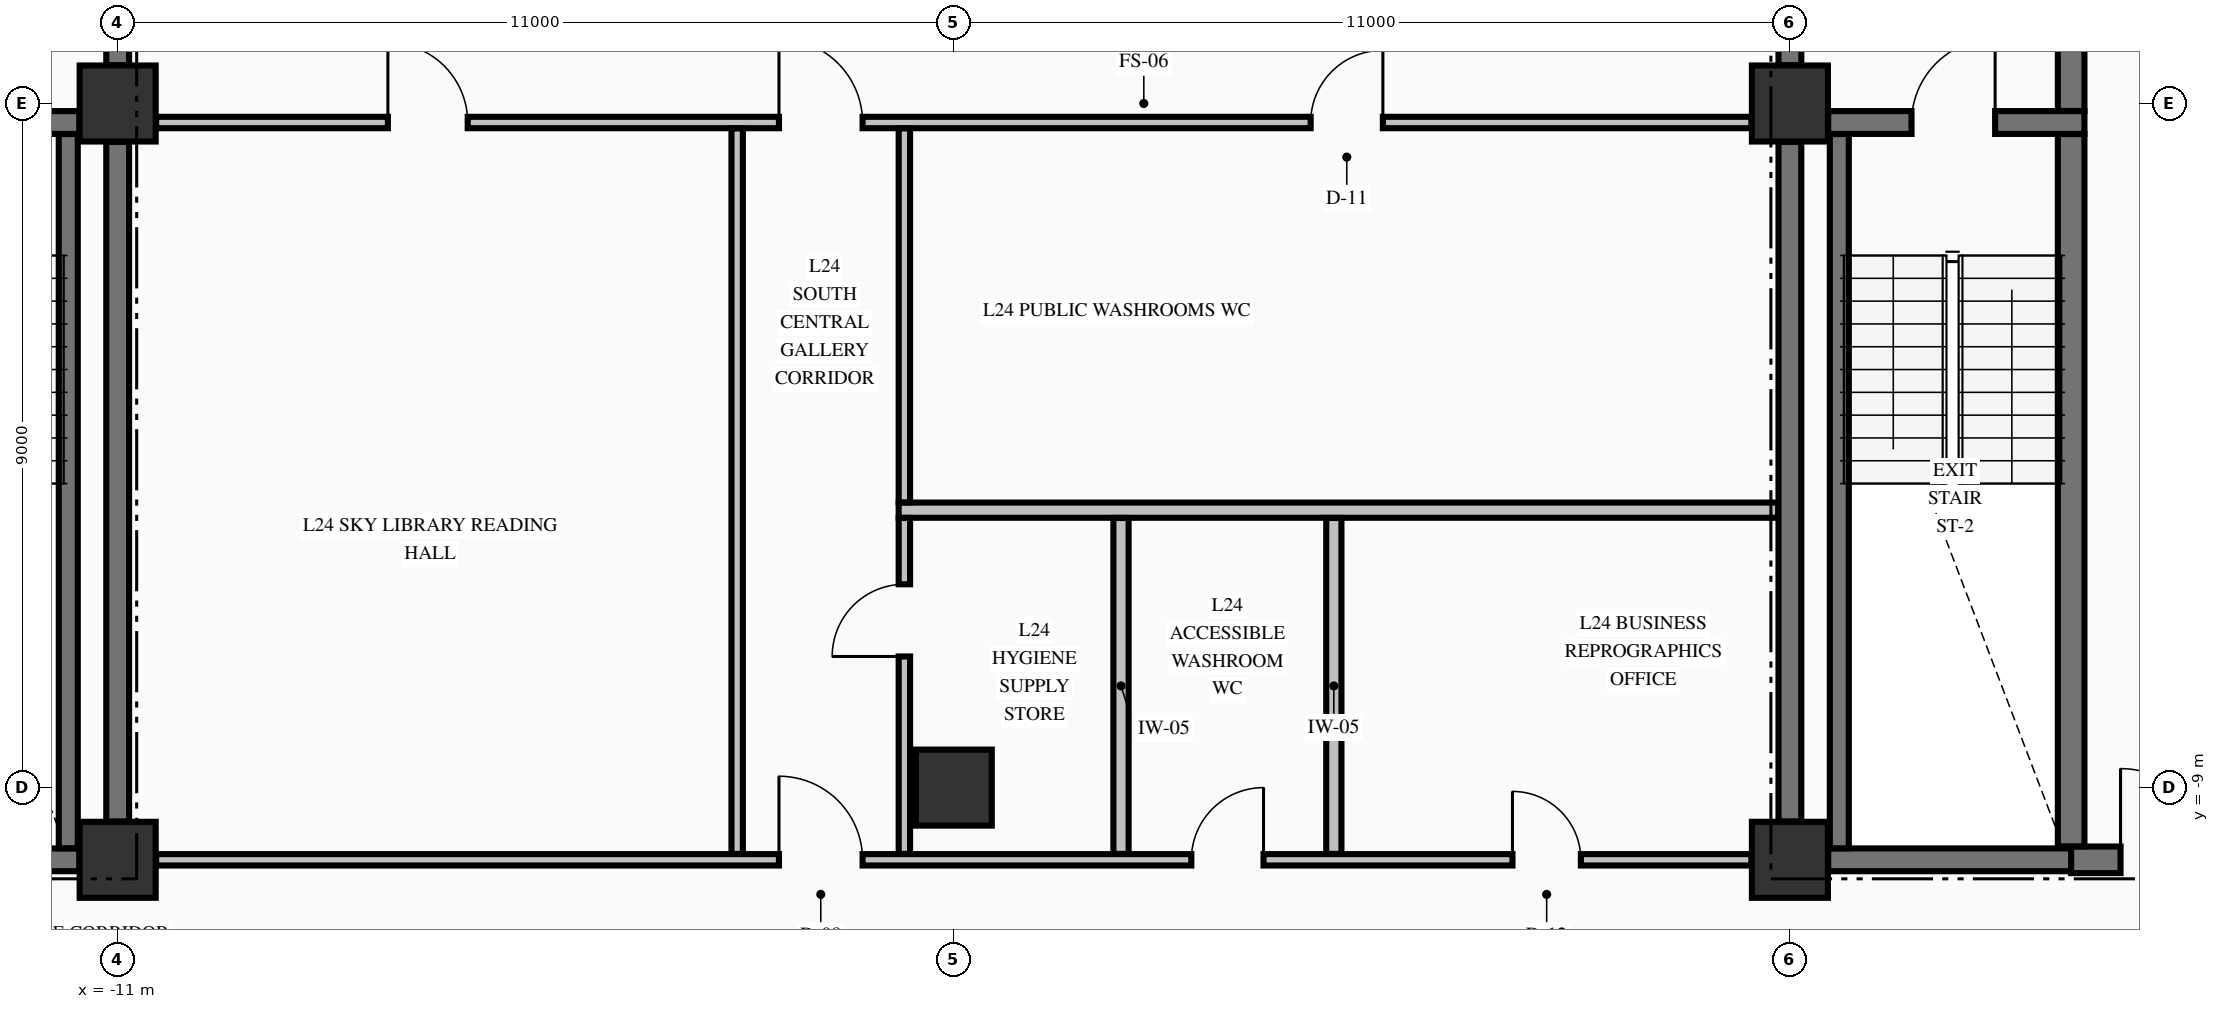
"""IFC4 building model, lengths in metres.
Left out: names, types, materials, properties, quantities, classifications, styles, units other than length and angle.
Written with IfcOpenShell. Run it as: python <this file> out.ifc"""

import sys

from ifc_helpers import new_model, si_unit, direction, frame, frame_2d, origin, origin_2d, place, context, subcontext, project, spatial, rectangle, extrude, element, fill, save


model = new_model("IFC4")
c1 = context("Model", 3, precision=1e-05, world=origin(), true_north=direction((0.0, 1.0)))
c2 = subcontext(c1, "Body", "Model", "MODEL_VIEW")
j1 = project(units=[si_unit("LENGTHUNIT", "METRE"), si_unit("PLANEANGLEUNIT", "RADIAN")], contexts=[c1])
p1 = place(None, origin())
s1 = spatial("IfcSite", under=j1, at=p1, CompositionType="ELEMENT")
p2 = place(p1, origin())
s2 = spatial("IfcBuilding", under=s1, at=p2, CompositionType="ELEMENT")
p3 = place(p2, frame((0.0, 0.0, 98.5)))
s3 = spatial("IfcBuildingStorey", under=s2, at=p3, CompositionType="ELEMENT", Elevation=98.5)
for number, where, z_axis, x_axis in (
    (1, (-11.0, -9.95, -0.275), (0.0, 0.0, 1.0), (1.0, 0.0, 0.0)),
    (2, (-11.0, 0.0, -0.275), (0.0, 0.0, 1.0), (1.0, 0.0, 0.0)),
    (3, (11.0, -9.95, -0.275), (0.0, 0.0, 1.0), (1.0, 0.0, 0.0)),
    (4, (11.0, 0.0, -0.275), (0.0, 0.0, 1.0), (1.0, 0.0, 0.0)),
    (5, (0.0, -9.0, -0.275), (0.0, 0.0, 1.0), (1.0, 0.0, 0.0)),
):
    element("IfcColumn", number, at=place(p3, frame(where, z_axis=z_axis, x_axis=x_axis)), inside=s3, PredefinedType="COLUMN", context=c2, shape_type="SweptSolid", body=[
        extrude(rectangle(XDim=1.0, YDim=1.0, at=origin_2d()), origin(), (0.0, 0.0, 1.0), 3.595),
    ])
for number, where, z_axis, x_axis in (
    (6, (-14.7, -9.95, 0.0), (0.0, 0.0, 1.0), (1.0, 0.0, 0.0)),
    (7, (11.504, -9.95, 0.0), (0.0, 0.0, 1.0), (1.0, 0.0, 0.0)),
):
    element("IfcWall", number, at=place(p3, frame(where, z_axis=z_axis, x_axis=x_axis)), inside=s3, PredefinedType="SHEAR", context=c2, shape_type="SweptSolid", body=[
        extrude(rectangle(XDim=3.196, YDim=0.3, at=frame_2d((1.598, 0.0))), origin(), (0.0, 0.0, 1.0), 3.32),
    ])
p4 = place(p3, frame((14.7, -9.95, 0.0), z_axis=(0.0, 0.0, 1.0), x_axis=(1.0, 0.0, 0.0)))
e8 = element("IfcWall", 8, at=p4, inside=s3, PredefinedType="SHEAR", context=c2, shape_type="SweptSolid", body=[
    extrude(rectangle(XDim=4.796, YDim=0.35, at=frame_2d((2.398, 0.0))), origin(), (0.0, 0.0, 1.0), 3.32),
])
p5 = place(p4, frame((0.65, 0.0, 0.0)))
e9 = element("IfcOpeningElement", 9, at=p5, cuts=e8, PredefinedType="OPENING", context=c2, shape_type="SweptSolid", body=[
    extrude(rectangle(XDim=1.2, YDim=2.15, at=frame_2d((0.6, 1.075))), frame((0.0, 0.185, 0.0), z_axis=(0.0, -1.0, 0.0), x_axis=(1.0, 0.0, 0.0)), (0.0, 0.0, 1.0), 0.37),
])
p6 = place(p3, frame((-19.496, -0.25, 0.0), z_axis=(0.0, 0.0, 1.0), x_axis=(1.0, 0.0, 0.0)))
e10 = element("IfcWall", 10, at=p6, inside=s3, PredefinedType="SHEAR", context=c2, shape_type="SweptSolid", body=[
    extrude(rectangle(XDim=7.992, YDim=0.3, at=frame_2d((3.996, 0.0))), origin(), (0.0, 0.0, 1.0), 3.32),
])
p7 = place(p6, frame((5.796, 0.0, 0.0)))
e11 = element("IfcOpeningElement", 11, at=p7, cuts=e10, PredefinedType="OPENING", context=c2, shape_type="SweptSolid", body=[
    extrude(rectangle(XDim=1.1, YDim=2.15, at=frame_2d((0.55, 1.075))), frame((0.0, 0.16, 0.0), z_axis=(0.0, -1.0, 0.0), x_axis=(1.0, 0.0, 0.0)), (0.0, 0.0, 1.0), 0.32),
])
p8 = place(p3, frame((11.504, -0.25, 0.0), z_axis=(0.0, 0.0, 1.0), x_axis=(1.0, 0.0, 0.0)))
e12 = element("IfcWall", 12, at=p8, inside=s3, PredefinedType="SHEAR", context=c2, shape_type="SweptSolid", body=[
    extrude(rectangle(XDim=3.371, YDim=0.3, at=frame_2d((1.686, 0.0))), origin(), (0.0, 0.0, 1.0), 3.32),
])
p9 = place(p8, frame((1.096, 0.0, 0.0)))
e13 = element("IfcOpeningElement", 13, at=p9, cuts=e12, PredefinedType="OPENING", context=c2, shape_type="SweptSolid", body=[
    extrude(rectangle(XDim=1.1, YDim=2.15, at=frame_2d((0.55, 1.075))), frame((0.0, 0.16, 0.0), z_axis=(0.0, -1.0, 0.0), x_axis=(1.0, 0.0, 0.0)), (0.0, 0.0, 1.0), 0.32),
])
p10 = place(p3, frame((-10.494, -9.95, 0.0), z_axis=(0.0, 0.0, 1.0), x_axis=(1.0, 0.0, 0.0)))
e14 = element("IfcWall", 14, at=p10, inside=s3, PredefinedType="PARTITIONING", context=c2, shape_type="SweptSolid", body=[
    extrude(rectangle(XDim=20.988, YDim=0.15, at=frame_2d((10.494, 0.0))), origin(), (0.0, 0.0, 1.0), 3.32),
])
p11 = place(p10, frame((8.194, 0.0, 0.0)))
e15 = element("IfcOpeningElement", 15, at=p11, cuts=e14, PredefinedType="OPENING", context=c2, shape_type="SweptSolid", body=[
    extrude(rectangle(XDim=1.1, YDim=2.15, at=frame_2d((0.55, 1.075))), frame((0.0, 0.085, 0.0), z_axis=(0.0, -1.0, 0.0), x_axis=(1.0, 0.0, 0.0)), (0.0, 0.0, 1.0), 0.17),
])
p12 = place(p10, frame((13.619, 0.0, 0.0)))
e16 = element("IfcOpeningElement", 16, at=p12, cuts=e14, PredefinedType="OPENING", context=c2, shape_type="SweptSolid", body=[
    extrude(rectangle(XDim=0.95, YDim=2.15, at=frame_2d((0.475, 1.075))), frame((0.0, 0.085, 0.0), z_axis=(0.0, -1.0, 0.0), x_axis=(1.0, 0.0, 0.0)), (0.0, 0.0, 1.0), 0.17),
])
p13 = place(p10, frame((17.844, 0.0, 0.0)))
e17 = element("IfcOpeningElement", 17, at=p13, cuts=e14, PredefinedType="OPENING", context=c2, shape_type="SweptSolid", body=[
    extrude(rectangle(XDim=0.9, YDim=2.15, at=frame_2d((0.45, 1.075))), frame((0.0, 0.085, 0.0), z_axis=(0.0, -1.0, 0.0), x_axis=(1.0, 0.0, 0.0)), (0.0, 0.0, 1.0), 0.17),
])
p14 = place(p3, frame((-0.725, -5.35, 0.0), z_axis=(0.0, 0.0, 1.0), x_axis=(1.0, 0.0, 0.0)))
e18 = element("IfcWall", 18, at=p14, inside=s3, PredefinedType="PARTITIONING", context=c2, shape_type="SweptSolid", body=[
    extrude(rectangle(XDim=11.572, YDim=0.2, at=frame_2d((5.786, 0.0))), origin(), (0.0, 0.0, 1.0), 3.32),
])
p15 = place(p3, frame((-10.494, -0.25, 0.0), z_axis=(0.0, 0.0, 1.0), x_axis=(1.0, 0.0, 0.0)))
e19 = element("IfcWall", 19, at=p15, inside=s3, PredefinedType="PARTITIONING", context=c2, shape_type="SweptSolid", body=[
    extrude(rectangle(XDim=20.988, YDim=0.15, at=frame_2d((10.494, 0.0))), origin(), (0.0, 0.0, 1.0), 3.32),
])
p16 = place(p15, frame((8.194, 0.0, 0.0)))
e20 = element("IfcOpeningElement", 20, at=p16, cuts=e19, PredefinedType="OPENING", context=c2, shape_type="SweptSolid", body=[
    extrude(rectangle(XDim=1.1, YDim=2.15, at=frame_2d((0.55, 1.075))), frame((0.0, 0.085, 0.0), z_axis=(0.0, -1.0, 0.0), x_axis=(1.0, 0.0, 0.0)), (0.0, 0.0, 1.0), 0.17),
])
p17 = place(p15, frame((3.049, 0.0, 0.0)))
e21 = element("IfcOpeningElement", 21, at=p17, cuts=e19, PredefinedType="OPENING", context=c2, shape_type="SweptSolid", body=[
    extrude(rectangle(XDim=1.05, YDim=2.15, at=frame_2d((0.525, 1.075))), frame((0.0, 0.085, 0.0), z_axis=(0.0, -1.0, 0.0), x_axis=(1.0, 0.0, 0.0)), (0.0, 0.0, 1.0), 0.17),
])
p18 = place(p15, frame((15.189, 0.0, 0.0)))
e22 = element("IfcOpeningElement", 22, at=p18, cuts=e19, PredefinedType="OPENING", context=c2, shape_type="SweptSolid", body=[
    extrude(rectangle(XDim=0.95, YDim=2.15, at=frame_2d((0.475, 1.075))), frame((0.0, 0.085, 0.0), z_axis=(0.0, -1.0, 0.0), x_axis=(1.0, 0.0, 0.0)), (0.0, 0.0, 1.0), 0.17),
])
p19 = place(p3, frame((-11.65, -9.798, 0.0), z_axis=(0.0, 0.0, 1.0), x_axis=(0.0, 1.0, 0.0)))
e23 = element("IfcWall", 23, at=p19, inside=s3, PredefinedType="SOLIDWALL", context=c2, shape_type="SweptSolid", body=[
    extrude(rectangle(XDim=9.396, YDim=0.25, at=frame_2d((4.698, 0.0))), origin(), (0.0, 0.0, 1.0), 3.32),
])
p20 = place(p3, frame((-11.0, -9.446, 0.0), z_axis=(0.0, 0.0, 1.0), x_axis=(0.0, 1.0, 0.0)))
e24 = element("IfcWall", 24, at=p20, inside=s3, PredefinedType="SHEAR", context=c2, shape_type="SweptSolid", body=[
    extrude(rectangle(XDim=8.942, YDim=0.3, at=frame_2d((4.471, 0.0))), origin(), (0.0, 0.0, 1.0), 3.32),
])
p21 = place(p3, frame((-11.0, 0.504, 0.0), z_axis=(0.0, 0.0, 1.0), x_axis=(0.0, 1.0, 0.0)))
e25 = element("IfcWall", 25, at=p21, inside=s3, PredefinedType="SHEAR", context=c2, shape_type="SweptSolid", body=[
    extrude(rectangle(XDim=2.244, YDim=0.3, at=frame_2d((1.122, 0.0))), origin(), (0.0, 0.0, 1.0), 3.32),
])
p22 = place(p21, frame((0.596, 0.0, 0.0)))
e26 = element("IfcOpeningElement", 26, at=p22, cuts=e25, PredefinedType="OPENING", context=c2, shape_type="SweptSolid", body=[
    extrude(rectangle(XDim=1.1, YDim=2.15, at=frame_2d((0.55, 1.075))), frame((0.0, 0.16, 0.0), z_axis=(0.0, -1.0, 0.0), x_axis=(1.0, 0.0, 0.0)), (0.0, 0.0, 1.0), 0.32),
])
p23 = place(p3, frame((11.0, -9.446, 0.0), z_axis=(0.0, 0.0, 1.0), x_axis=(0.0, 1.0, 0.0)))
e27 = element("IfcWall", 27, at=p23, inside=s3, PredefinedType="SHEAR", context=c2, shape_type="SweptSolid", body=[
    extrude(rectangle(XDim=8.942, YDim=0.3, at=frame_2d((4.471, 0.0))), origin(), (0.0, 0.0, 1.0), 3.32),
])
p24 = place(p3, frame((11.0, 0.504, 0.0), z_axis=(0.0, 0.0, 1.0), x_axis=(0.0, 1.0, 0.0)))
e28 = element("IfcWall", 28, at=p24, inside=s3, PredefinedType="SHEAR", context=c2, shape_type="SweptSolid", body=[
    extrude(rectangle(XDim=2.244, YDim=0.3, at=frame_2d((1.122, 0.0))), origin(), (0.0, 0.0, 1.0), 3.32),
])
p25 = place(p24, frame((0.596, 0.0, 0.0)))
e29 = element("IfcOpeningElement", 29, at=p25, cuts=e28, PredefinedType="OPENING", context=c2, shape_type="SweptSolid", body=[
    extrude(rectangle(XDim=1.1, YDim=2.15, at=frame_2d((0.55, 1.075))), frame((0.0, 0.16, 0.0), z_axis=(0.0, -1.0, 0.0), x_axis=(1.0, 0.0, 0.0)), (0.0, 0.0, 1.0), 0.32),
])
p26 = place(p3, frame((11.65, -9.798, 0.0), z_axis=(0.0, 0.0, 1.0), x_axis=(0.0, 1.0, 0.0)))
e30 = element("IfcWall", 30, at=p26, inside=s3, PredefinedType="SOLIDWALL", context=c2, shape_type="SweptSolid", body=[
    extrude(rectangle(XDim=9.396, YDim=0.25, at=frame_2d((4.698, 0.0))), origin(), (0.0, 0.0, 1.0), 3.32),
])
p27 = place(p3, frame((14.7, -9.773, 0.0), z_axis=(0.0, 0.0, 1.0), x_axis=(0.0, 1.0, 0.0)))
e31 = element("IfcWall", 31, at=p27, inside=s3, PredefinedType="SHEAR", context=c2, shape_type="SweptSolid", body=[
    extrude(rectangle(XDim=9.371, YDim=0.35, at=frame_2d((4.686, 0.0))), origin(), (0.0, 0.0, 1.0), 3.32),
])
p28 = place(p3, frame((14.7, -0.098, 0.0), z_axis=(0.0, 0.0, 1.0), x_axis=(0.0, 1.0, 0.0)))
e32 = element("IfcWall", 32, at=p28, inside=s3, PredefinedType="SHEAR", context=c2, shape_type="SweptSolid", body=[
    extrude(rectangle(XDim=2.846, YDim=0.35, at=frame_2d((1.423, 0.0))), origin(), (0.0, 0.0, 1.0), 3.32),
])
p29 = place(p3, frame((-2.85, -9.872, 0.0), z_axis=(0.0, 0.0, 1.0), x_axis=(0.0, 1.0, 0.0)))
e33 = element("IfcWall", 33, at=p29, inside=s3, PredefinedType="PARTITIONING", context=c2, shape_type="SweptSolid", body=[
    extrude(rectangle(XDim=9.544, YDim=0.15, at=frame_2d((4.772, 0.0))), origin(), (0.0, 0.0, 1.0), 3.32),
])
p30 = place(p3, frame((-0.65, -9.872, 0.0), z_axis=(0.0, 0.0, 1.0), x_axis=(0.0, 1.0, 0.0)))
e34 = element("IfcWall", 34, at=p30, inside=s3, PredefinedType="PARTITIONING", context=c2, shape_type="SweptSolid", body=[
    extrude(rectangle(XDim=4.419, YDim=0.15, at=frame_2d((2.209, 0.0))), origin(), (0.0, 0.0, 1.0), 3.32),
])
p31 = place(p30, frame((2.597, 0.0, 0.0)))
e35 = element("IfcOpeningElement", 35, at=p31, cuts=e34, PredefinedType="OPENING", context=c2, shape_type="SweptSolid", body=[
    extrude(rectangle(XDim=0.95, YDim=2.15, at=frame_2d((0.475, 1.075))), frame((0.0, 0.085, 0.0), z_axis=(0.0, -1.0, 0.0), x_axis=(1.0, 0.0, 0.0)), (0.0, 0.0, 1.0), 0.17),
])
p32 = place(p3, frame((-0.65, -5.247, 0.0), z_axis=(0.0, 0.0, 1.0), x_axis=(0.0, 1.0, 0.0)))
e36 = element("IfcWall", 36, at=p32, inside=s3, PredefinedType="PARTITIONING", context=c2, shape_type="SweptSolid", body=[
    extrude(rectangle(XDim=4.919, YDim=0.15, at=frame_2d((2.459, 0.0))), origin(), (0.0, 0.0, 1.0), 3.32),
])
for number, where, z_axis, x_axis in (
    (37, (2.2, -9.872, 0.0), (0.0, 0.0, 1.0), (0.0, 1.0, 0.0)),
    (38, (5.0, -9.872, 0.0), (0.0, 0.0, 1.0), (0.0, 1.0, 0.0)),
):
    element("IfcWall", number, at=place(p3, frame(where, z_axis=z_axis, x_axis=x_axis)), inside=s3, PredefinedType="PARTITIONING", context=c2, shape_type="SweptSolid", body=[
        extrude(rectangle(XDim=4.419, YDim=0.2, at=frame_2d((2.209, 0.0))), origin(), (0.0, 0.0, 1.0), 3.32),
    ])
p33 = place(p9, origin())
e39 = element("IfcDoor", 39, at=p33, inside=s3, OperationType="SINGLE_SWING_RIGHT", PredefinedType="DOOR", context=c2, shape_type="SweptSolid", body=[
    extrude(rectangle(XDim=1.1, YDim=2.15, at=frame_2d((0.55, 1.075))), frame((0.0, 0.025, 0.0), z_axis=(0.0, -1.0, 0.0), x_axis=(1.0, 0.0, 0.0)), (0.0, 0.0, 1.0), 0.05),
])
fill(e13, e39)
p34 = place(p5, origin())
e40 = element("IfcDoor", 40, at=p34, inside=s3, OperationType="SINGLE_SWING_LEFT", PredefinedType="DOOR", context=c2, shape_type="SweptSolid", body=[
    extrude(rectangle(XDim=1.2, YDim=2.15, at=frame_2d((0.6, 1.075))), frame((0.0, 0.025, 0.0), z_axis=(0.0, -1.0, 0.0), x_axis=(1.0, 0.0, 0.0)), (0.0, 0.0, 1.0), 0.05),
])
fill(e9, e40)
p35 = place(p11, origin())
e41 = element("IfcDoor", 41, at=p35, inside=s3, OperationType="SINGLE_SWING_LEFT", PredefinedType="DOOR", context=c2, shape_type="SweptSolid", body=[
    extrude(rectangle(XDim=1.1, YDim=2.15, at=frame_2d((0.55, 1.075))), frame((0.0, 0.025, 0.0), z_axis=(0.0, -1.0, 0.0), x_axis=(1.0, 0.0, 0.0)), (0.0, 0.0, 1.0), 0.05),
])
fill(e15, e41)
p36 = place(p16, origin())
e42 = element("IfcDoor", 42, at=p36, inside=s3, OperationType="SINGLE_SWING_LEFT", PredefinedType="DOOR", context=c2, shape_type="SweptSolid", body=[
    extrude(rectangle(XDim=1.1, YDim=2.15, at=frame_2d((0.55, 1.075))), frame((0.0, 0.025, 0.0), z_axis=(0.0, -1.0, 0.0), x_axis=(1.0, 0.0, 0.0)), (0.0, 0.0, 1.0), 0.05),
])
fill(e20, e42)
p37 = place(p17, origin())
e43 = element("IfcDoor", 43, at=p37, inside=s3, OperationType="SINGLE_SWING_LEFT", PredefinedType="DOOR", context=c2, shape_type="SweptSolid", body=[
    extrude(rectangle(XDim=1.05, YDim=2.15, at=frame_2d((0.525, 1.075))), frame((0.0, 0.025, 0.0), z_axis=(0.0, -1.0, 0.0), x_axis=(1.0, 0.0, 0.0)), (0.0, 0.0, 1.0), 0.05),
])
fill(e21, e43)
p38 = place(p18, origin())
e44 = element("IfcDoor", 44, at=p38, inside=s3, OperationType="SINGLE_SWING_RIGHT", PredefinedType="DOOR", context=c2, shape_type="SweptSolid", body=[
    extrude(rectangle(XDim=0.95, YDim=2.15, at=frame_2d((0.475, 1.075))), frame((0.0, 0.025, 0.0), z_axis=(0.0, -1.0, 0.0), x_axis=(1.0, 0.0, 0.0)), (0.0, 0.0, 1.0), 0.05),
])
fill(e22, e44)
p39 = place(p31, origin())
e45 = element("IfcDoor", 45, at=p39, inside=s3, OperationType="SINGLE_SWING_LEFT", PredefinedType="DOOR", context=c2, shape_type="SweptSolid", body=[
    extrude(rectangle(XDim=0.95, YDim=2.15, at=frame_2d((0.475, 1.075))), frame((0.0, 0.025, 0.0), z_axis=(0.0, -1.0, 0.0), x_axis=(1.0, 0.0, 0.0)), (0.0, 0.0, 1.0), 0.05),
])
fill(e35, e45)
p40 = place(p12, origin())
e46 = element("IfcDoor", 46, at=p40, inside=s3, OperationType="SINGLE_SWING_RIGHT", PredefinedType="DOOR", context=c2, shape_type="SweptSolid", body=[
    extrude(rectangle(XDim=0.95, YDim=2.15, at=frame_2d((0.475, 1.075))), frame((0.0, 0.025, 0.0), z_axis=(0.0, -1.0, 0.0), x_axis=(1.0, 0.0, 0.0)), (0.0, 0.0, 1.0), 0.05),
])
fill(e16, e46)
p41 = place(p13, origin())
e47 = element("IfcDoor", 47, at=p41, inside=s3, OperationType="SINGLE_SWING_LEFT", PredefinedType="DOOR", context=c2, shape_type="SweptSolid", body=[
    extrude(rectangle(XDim=0.9, YDim=2.15, at=frame_2d((0.45, 1.075))), frame((0.0, 0.025, 0.0), z_axis=(0.0, -1.0, 0.0), x_axis=(1.0, 0.0, 0.0)), (0.0, 0.0, 1.0), 0.05),
])
fill(e17, e47)
save(model, sys.argv[1])
